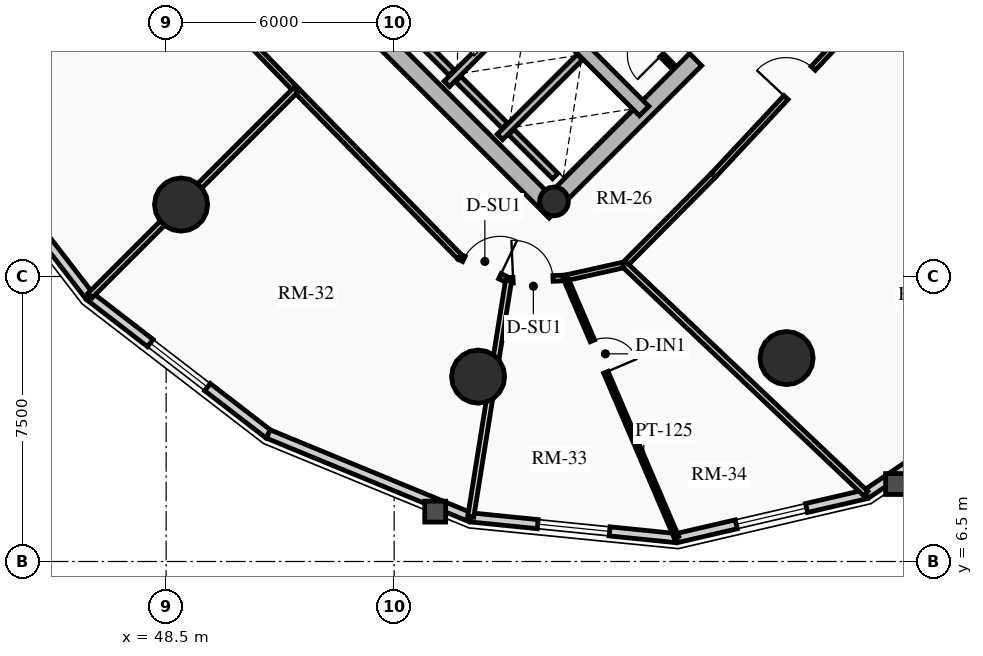
"""IFC4 building model, lengths in metres.
Left out: names, types, materials, properties, quantities, classifications, styles, units other than length and angle.
Written with IfcOpenShell. Run it as: python <this file> out.ifc"""

import sys

from ifc_helpers import new_model, si_unit, direction, frame, frame_2d, origin, origin_2d, place, context, subcontext, project, spatial, rectangle, circle, hollow_circle, extrude, source, transform, mapped, element, fill, save


model = new_model("IFC4")
c1 = context("Model", 3, precision=1e-05, world=origin(), true_north=direction((0.0, 1.0)))
c2 = subcontext(c1, "Body", "Model", "MODEL_VIEW")
j1 = project(units=[si_unit("LENGTHUNIT", "METRE"), si_unit("PLANEANGLEUNIT", "RADIAN")], contexts=[c1])
p1 = place(None, origin())
s1 = spatial("IfcSite", under=j1, at=p1, CompositionType="ELEMENT")
p2 = place(p1, origin())
s2 = spatial("IfcBuilding", under=s1, at=p2, CompositionType="ELEMENT")
p3 = place(p2, frame((0.0, 0.0, 81.79)))
s3 = spatial("IfcBuildingStorey", under=s2, at=p3, CompositionType="ELEMENT", Elevation=81.79)
p4 = place(p3, frame((58.737, 15.697, 0.0), z_axis=(0.0, 0.0, 1.0), x_axis=(-0.707106781187, 0.707106781187, 0.0)))
e1 = element("IfcWall", 1, at=p4, inside=s3, PredefinedType="SHEAR", context=c2, shape_type="SweptSolid", body=[
    extrude(rectangle(XDim=14.2, YDim=0.45, at=frame_2d((7.1, 0.0))), origin(), (0.0, 0.0, 1.0), 2.91),
])
p5 = place(p3, frame((58.578, 15.856, 0.0), z_axis=(0.0, 0.0, 1.0), x_axis=(0.707106781187, 0.707106781187, 0.0)))
e2 = element("IfcWall", 2, at=p5, inside=s3, PredefinedType="SHEAR", context=c2, shape_type="SweptSolid", body=[
    extrude(rectangle(XDim=10.7, YDim=0.45, at=frame_2d((5.35, 0.0))), origin(), (0.0, 0.0, 1.0), 2.91),
])
m1 = source(origin(), c2, "Body", "SweptSolid", [
    extrude(rectangle(XDim=1.5, YDim=2.02, at=frame_2d((0.75, 1.01))), frame((0.0, 0.235, 0.0), z_axis=(0.0, -1.0, 0.0), x_axis=(1.0, 0.0, 0.0)), (0.0, 0.0, 1.0), 0.47),
])
p6 = place(p5, frame((5.45, 0.0, 0.0)))
e3 = element("IfcOpeningElement", 3, at=p6, cuts=e2, PredefinedType="OPENING", context=c2, shape_type="MappedRepresentation", body=[
    mapped(m1, transform((0.0, 0.0, 0.0), x_axis=(1.0, 0.0, 0.0), y_axis=(0.0, 1.0, 0.0), z_axis=(0.0, 0.0, 1.0), scale=1.0)),
])
p7 = place(p3, frame((61.078, 18.355, 0.0), z_axis=(0.0, 0.0, 1.0), x_axis=(-0.707106781187, 0.707106781187, 0.0)))
e4 = element("IfcWall", 4, at=p7, inside=s3, PredefinedType="SHEAR", context=c2, shape_type="SweptSolid", body=[
    extrude(rectangle(XDim=13.75, YDim=0.35, at=frame_2d((6.875, 0.0))), origin(), (0.0, 0.0, 1.0), 2.91),
])
m2 = source(origin(), c2, "Body", "SweptSolid", [
    extrude(rectangle(XDim=1.1, YDim=2.015, at=frame_2d((0.55, 1.007))), frame((0.0, 0.185, 0.0), z_axis=(0.0, -1.0, 0.0), x_axis=(1.0, 0.0, 0.0)), (0.0, 0.0, 1.0), 0.37),
])
p8 = place(p7, frame((4.875, 0.0, 0.0)))
e5 = element("IfcOpeningElement", 5, at=p8, cuts=e4, PredefinedType="OPENING", context=c2, shape_type="MappedRepresentation", body=[
    mapped(m2, transform((0.0, 0.0, 0.0), x_axis=(1.0, 0.0, 0.0), y_axis=(0.0, 1.0, 0.0), z_axis=(0.0, 0.0, 1.0), scale=1.0)),
])
m3 = source(origin(), c2, "Body", "SweptSolid", [
    extrude(rectangle(XDim=1.15, YDim=2.02, at=frame_2d((0.575, 1.01))), frame((0.0, 0.185, 0.0), z_axis=(0.0, -1.0, 0.0), x_axis=(1.0, 0.0, 0.0)), (0.0, 0.0, 1.0), 0.37),
])
p9 = place(p7, frame((7.295, 0.0, 0.0)))
e6 = element("IfcOpeningElement", 6, at=p9, cuts=e4, PredefinedType="OPENING", context=c2, shape_type="MappedRepresentation", body=[
    mapped(m3, transform((0.0, 0.0, 0.0), x_axis=(1.0, 0.0, 0.0), y_axis=(0.0, 1.0, 0.0), z_axis=(0.0, 0.0, 1.0), scale=1.0)),
])
p10 = place(p3, frame((58.706, 15.976, 0.0), z_axis=(0.0, 0.0, 1.0), x_axis=(0.707106781187, 0.707106781187, 0.0)))
e7 = element("IfcColumn", 7, at=p10, inside=s3, PredefinedType="COLUMN", context=c2, shape_type="SweptSolid", body=[
    extrude(hollow_circle(Radius=0.38, WallThickness=0.032, at=origin_2d()), origin(), (0.0, 0.0, 1.0), 2.91),
])
for number, where, z_axis, x_axis in (
    (8, (48.893, 15.893, 0.0), (0.0, 0.0, 1.0), (1.0, 0.0, 0.0)),
    (9, (56.709, 11.365, 0.0), (0.0, 0.0, 1.0), (1.0, 0.0, 0.0)),
    (10, (64.827, 11.854, 0.0), (0.0, 0.0, 1.0), (1.0, 0.0, 0.0)),
):
    element("IfcColumn", number, at=place(p3, frame(where, z_axis=z_axis, x_axis=x_axis)), inside=s3, PredefinedType="USERDEFINED", context=c2, shape_type="SweptSolid", body=[
        extrude(circle(Radius=0.7, at=origin_2d()), origin(), (0.0, 0.0, 1.0), 2.91),
    ])
p11 = place(p3, frame((46.483, 13.483, 0.0), z_axis=(0.0, 0.0, 1.0), x_axis=(-0.61054437102, 0.791982052206, 0.0)))
e11 = element("IfcWall", 11, at=p11, inside=s3, PredefinedType="SOLIDWALL", context=c2, shape_type="SweptSolid", body=[
    extrude(rectangle(XDim=5.942, YDim=0.24, at=frame_2d((2.971, 0.0))), origin(), (0.0, 0.0, 1.0), 2.179),
])
p12 = place(p3, frame((51.189, 9.855, 0.0), z_axis=(0.0, 0.0, 1.0), x_axis=(-0.791982052206, 0.61054437102, 0.0)))
e12 = element("IfcWall", 12, at=p12, inside=s3, PredefinedType="SOLIDWALL", context=c2, shape_type="SweptSolid", body=[
    extrude(rectangle(XDim=5.942, YDim=0.24, at=frame_2d((2.971, 0.0))), origin(), (0.0, 0.0, 1.0), 2.179),
])
m4 = source(origin(), c2, "Body", "SweptSolid", [
    extrude(rectangle(XDim=1.9, YDim=1.35, at=frame_2d((0.95, 0.675))), frame((0.0, 0.13, 0.0), z_axis=(0.0, -1.0, 0.0), x_axis=(1.0, 0.0, 0.0)), (0.0, 0.0, 1.0), 0.26),
])
p13 = place(p12, frame((2.021, 0.0, 0.65)))
e13 = element("IfcOpeningElement", 13, at=p13, cuts=e12, PredefinedType="OPENING", context=c2, shape_type="MappedRepresentation", body=[
    mapped(m4, transform((0.0, 0.0, 0.0), x_axis=(1.0, 0.0, 0.0), y_axis=(0.0, 1.0, 0.0), z_axis=(0.0, 0.0, 1.0), scale=1.0)),
])
p14 = place(p3, frame((56.513, 7.661, 0.0), z_axis=(0.0, 0.0, 1.0), x_axis=(-0.924563909604, 0.381027003055, 0.0)))
e14 = element("IfcWall", 14, at=p14, inside=s3, PredefinedType="SOLIDWALL", context=c2, shape_type="SweptSolid", body=[
    extrude(rectangle(XDim=5.758, YDim=0.24, at=frame_2d((2.879, 0.0))), origin(), (0.0, 0.0, 1.0), 2.179),
])
p15 = place(p3, frame((61.933, 7.115, 0.0), z_axis=(0.0, 0.0, 1.0), x_axis=(-0.994971754311, 0.10015591906, 0.0)))
e15 = element("IfcWall", 15, at=p15, inside=s3, PredefinedType="SOLIDWALL", context=c2, shape_type="SweptSolid", body=[
    extrude(rectangle(XDim=5.448, YDim=0.24, at=frame_2d((2.724, 0.0))), origin(), (0.0, 0.0, 1.0), 2.179),
])
p16 = place(p15, frame((1.774, 0.0, 0.65)))
e16 = element("IfcOpeningElement", 16, at=p16, cuts=e15, PredefinedType="OPENING", context=c2, shape_type="MappedRepresentation", body=[
    mapped(m4, transform((0.0, 0.0, 0.0), x_axis=(1.0, 0.0, 0.0), y_axis=(0.0, 1.0, 0.0), z_axis=(0.0, 0.0, 1.0), scale=1.0)),
])
p17 = place(p3, frame((66.92, 8.271, 0.0), z_axis=(0.0, 0.0, 1.0), x_axis=(-0.974165631126, -0.225834725257, 0.0)))
e17 = element("IfcWall", 17, at=p17, inside=s3, PredefinedType="SOLIDWALL", context=c2, shape_type="SweptSolid", body=[
    extrude(rectangle(XDim=5.119, YDim=0.24, at=frame_2d((2.56, 0.0))), origin(), (0.0, 0.0, 1.0), 2.179),
])
p18 = place(p17, frame((1.609, 0.0, 0.65)))
e18 = element("IfcOpeningElement", 18, at=p18, cuts=e17, PredefinedType="OPENING", context=c2, shape_type="MappedRepresentation", body=[
    mapped(m4, transform((0.0, 0.0, 0.0), x_axis=(1.0, 0.0, 0.0), y_axis=(0.0, 1.0, 0.0), z_axis=(0.0, 0.0, 1.0), scale=1.0)),
])
p19 = place(p3, frame((70.985, 11.015, 0.0), z_axis=(0.0, 0.0, 1.0), x_axis=(-0.828781148131, -0.559572880421, 0.0)))
e19 = element("IfcWall", 19, at=p19, inside=s3, PredefinedType="SOLIDWALL", context=c2, shape_type="SweptSolid", body=[
    extrude(rectangle(XDim=4.905, YDim=0.24, at=frame_2d((2.452, 0.0))), origin(), (0.0, 0.0, 1.0), 2.179),
])
p20 = place(p3, frame((55.888, 19.069, 0.0), z_axis=(0.0, 0.0, 1.0), x_axis=(0.707106781187, 0.707106781187, 0.0)))
e20 = element("IfcWall", 20, at=p20, inside=s3, PredefinedType="SHEAR", context=c2, shape_type="SweptSolid", body=[
    extrude(rectangle(XDim=2.97, YDim=0.2, at=frame_2d((1.485, 0.0))), origin(), (0.0, 0.0, 1.0), 2.91),
])
p21 = place(p3, frame((56.015, 19.366, 0.0), z_axis=(0.0, 0.0, 1.0), x_axis=(-0.707106781187, 0.707106781187, 0.0)))
e21 = element("IfcWall", 21, at=p21, inside=s3, PredefinedType="SHEAR", context=c2, shape_type="SweptSolid", body=[
    extrude(rectangle(XDim=2.44, YDim=0.2, at=frame_2d((1.22, 0.0))), origin(), (0.0, 0.0, 1.0), 2.91),
])
p22 = place(p3, frame((57.284, 17.673, 0.0), z_axis=(0.0, 0.0, 1.0), x_axis=(0.707147878904, 0.70706568108, 0.0)))
e22 = element("IfcWall", 22, at=p22, inside=s3, PredefinedType="SHEAR", context=c2, shape_type="SweptSolid", body=[
    extrude(rectangle(XDim=2.97, YDim=0.2, at=frame_2d((1.485, 0.0))), origin(), (0.0, 0.0, 1.0), 2.91),
])
p23 = place(p3, frame((57.412, 17.97, 0.0), z_axis=(0.0, 0.0, 1.0), x_axis=(-0.707106781187, 0.707106781187, 0.0)))
e23 = element("IfcWall", 23, at=p23, inside=s3, PredefinedType="SHEAR", context=c2, shape_type="SweptSolid", body=[
    extrude(rectangle(XDim=1.735, YDim=0.2, at=frame_2d((0.867, 0.0))), origin(), (0.0, 0.0, 1.0), 2.91),
])
p24 = place(p3, frame((58.737, 16.644, 0.0), z_axis=(0.0, 0.0, 1.0), x_axis=(-0.707032117043, 0.707181437447, 0.0)))
e24 = element("IfcWall", 24, at=p24, inside=s3, PredefinedType="SHEAR", context=c2, shape_type="SweptSolid", body=[
    extrude(rectangle(XDim=1.635, YDim=0.2, at=frame_2d((0.817, 0.0))), origin(), (0.0, 0.0, 1.0), 2.91),
])
p25 = place(p3, frame((61.835, 19.529, 0.0), z_axis=(0.0, 0.0, 1.0), x_axis=(-0.707174592913, 0.707038962956, 0.0)))
e25 = element("IfcWall", 25, at=p25, inside=s3, PredefinedType="PARTITIONING", context=c2, shape_type="SweptSolid", body=[
    extrude(rectangle(XDim=1.8, YDim=0.125, at=frame_2d((0.9, 0.0))), origin(), (0.0, 0.0, 1.0), 2.655),
])
m5 = source(origin(), c2, "Body", "SweptSolid", [
    extrude(rectangle(XDim=0.9, YDim=2.005, at=frame_2d((0.45, 1.002))), frame((0.0, 0.073, 0.0), z_axis=(0.0, -1.0, 0.0), x_axis=(1.0, 0.0, 0.0)), (0.0, 0.0, 1.0), 0.145),
])
p26 = place(p25, frame((0.42, 0.0, 0.0)))
e26 = element("IfcOpeningElement", 26, at=p26, cuts=e25, PredefinedType="OPENING", context=c2, shape_type="MappedRepresentation", body=[
    mapped(m5, transform((0.0, 0.0, 0.0), x_axis=(1.0, 0.0, 0.0), y_axis=(0.0, 1.0, 0.0), z_axis=(0.0, 0.0, 1.0), scale=1.0)),
])
p27 = place(p3, frame((47.706, 23.253, 0.0), z_axis=(0.0, 0.0, 1.0), x_axis=(0.696179266346, -0.717867974707, 0.0)))
e27 = element("IfcWall", 27, at=p27, inside=s3, PredefinedType="PARTITIONING", context=c2, shape_type="SweptSolid", body=[
    extrude(rectangle(XDim=6.045, YDim=0.15, at=frame_2d((3.022, 0.0))), origin(), (0.0, 0.0, 1.0), 2.655),
])
m6 = source(origin(), c2, "Body", "SweptSolid", [
    extrude(rectangle(XDim=1.05, YDim=2.015, at=frame_2d((0.525, 1.007))), frame((0.0, 0.085, 0.0), z_axis=(0.0, -1.0, 0.0), x_axis=(1.0, 0.0, 0.0)), (0.0, 0.0, 1.0), 0.17),
])
p28 = place(p27, frame((2.497, 0.0, 0.0)))
e28 = element("IfcOpeningElement", 28, at=p28, cuts=e27, PredefinedType="OPENING", context=c2, shape_type="MappedRepresentation", body=[
    mapped(m6, transform((0.0, 0.0, 0.0), x_axis=(1.0, 0.0, 0.0), y_axis=(0.0, 1.0, 0.0), z_axis=(0.0, 0.0, 1.0), scale=1.0)),
])
p29 = place(p3, frame((51.914, 18.914, 0.0), z_axis=(0.0, 0.0, 1.0), x_axis=(0.699999313799, -0.714143515465, 0.0)))
e29 = element("IfcWall", 29, at=p29, inside=s3, PredefinedType="PARTITIONING", context=c2, shape_type="SweptSolid", body=[
    extrude(rectangle(XDim=6.162, YDim=0.15, at=frame_2d((3.081, 0.0))), origin(), (0.0, 0.0, 1.0), 2.225),
])
p30 = place(p3, frame((56.227, 14.513, 0.0), z_axis=(0.0, 0.0, 1.0), x_axis=(0.901477579283, -0.432825801044, 0.0)))
e30 = element("IfcWall", 30, at=p30, inside=s3, PredefinedType="PARTITIONING", context=c2, shape_type="SweptSolid", body=[
    extrude(rectangle(XDim=1.424, YDim=0.15, at=frame_2d((0.712, 0.0))), origin(), (0.0, 0.0, 1.0), 2.225),
])
p31 = place(p30, frame((0.12, 0.0, 0.0)))
e31 = element("IfcOpeningElement", 31, at=p31, cuts=e30, PredefinedType="OPENING", context=c2, shape_type="MappedRepresentation", body=[
    mapped(m6, transform((0.0, 0.0, 0.0), x_axis=(1.0, 0.0, 0.0), y_axis=(0.0, 1.0, 0.0), z_axis=(0.0, 0.0, 1.0), scale=1.0)),
])
p32 = place(p3, frame((57.511, 13.897, 0.0), z_axis=(0.0, 0.0, 1.0), x_axis=(0.999024538494, 0.044158481476, 0.0)))
e32 = element("IfcWall", 32, at=p32, inside=s3, PredefinedType="PARTITIONING", context=c2, shape_type="SweptSolid", body=[
    extrude(rectangle(XDim=1.498, YDim=0.15, at=frame_2d((0.749, 0.0))), origin(), (0.0, 0.0, 1.0), 2.225),
])
p33 = place(p32, frame((0.12, 0.0, 0.0)))
e33 = element("IfcOpeningElement", 33, at=p33, cuts=e32, PredefinedType="OPENING", context=c2, shape_type="MappedRepresentation", body=[
    mapped(m6, transform((0.0, 0.0, 0.0), x_axis=(1.0, 0.0, 0.0), y_axis=(0.0, 1.0, 0.0), z_axis=(0.0, 0.0, 1.0), scale=1.0)),
])
p34 = place(p3, frame((59.008, 13.963, 0.0), z_axis=(0.0, 0.0, 1.0), x_axis=(0.976020856791, 0.21767702476, 0.0)))
e34 = element("IfcWall", 34, at=p34, inside=s3, PredefinedType="PARTITIONING", context=c2, shape_type="SweptSolid", body=[
    extrude(rectangle(XDim=1.593, YDim=0.15, at=frame_2d((0.796, 0.0))), origin(), (0.0, 0.0, 1.0), 2.225),
])
p35 = place(p3, frame((60.562, 14.31, 0.0), z_axis=(0.0, 0.0, 1.0), x_axis=(0.704566236161, 0.709638230975, 0.0)))
e35 = element("IfcWall", 35, at=p35, inside=s3, PredefinedType="PARTITIONING", context=c2, shape_type="SweptSolid", body=[
    extrude(rectangle(XDim=3.321, YDim=0.15, at=frame_2d((1.661, 0.0))), origin(), (0.0, 0.0, 1.0), 2.225),
])
p36 = place(p3, frame((62.903, 16.667, 0.0), z_axis=(0.0, 0.0, 1.0), x_axis=(0.682371947497, 0.731005147225, 0.0)))
e36 = element("IfcWall", 36, at=p36, inside=s3, PredefinedType="PARTITIONING", context=c2, shape_type="SweptSolid", body=[
    extrude(rectangle(XDim=6.642, YDim=0.15, at=frame_2d((3.321, 0.0))), origin(), (0.0, 0.0, 1.0), 2.225),
])
p37 = place(p36, frame((2.796, 0.0, 0.0)))
e37 = element("IfcOpeningElement", 37, at=p37, cuts=e36, PredefinedType="OPENING", context=c2, shape_type="MappedRepresentation", body=[
    mapped(m6, transform((0.0, 0.0, 0.0), x_axis=(1.0, 0.0, 0.0), y_axis=(0.0, 1.0, 0.0), z_axis=(0.0, 0.0, 1.0), scale=1.0)),
])
p38 = place(p3, frame((51.914, 18.914, 0.0), z_axis=(0.0, 0.0, 1.0), x_axis=(-0.707106781187, -0.707106781187, 0.0)))
e38 = element("IfcWall", 38, at=p38, inside=s3, PredefinedType="PARTITIONING", context=c2, shape_type="SweptSolid", body=[
    extrude(rectangle(XDim=7.661, YDim=0.16, at=frame_2d((3.831, 0.0))), origin(), (0.0, 0.0, 1.0), 2.179),
])
p39 = place(p3, frame((57.511, 13.897, 0.0), z_axis=(0.0, 0.0, 1.0), x_axis=(-0.15810696167, -0.987421991183, 0.0)))
e39 = element("IfcWall", 39, at=p39, inside=s3, PredefinedType="PARTITIONING", context=c2, shape_type="SweptSolid", body=[
    extrude(rectangle(XDim=6.295, YDim=0.16, at=frame_2d((3.148, 0.0))), origin(), (0.0, 0.0, 1.0), 2.179),
])
p40 = place(p3, frame((60.562, 14.31, 0.0), z_axis=(0.0, 0.0, 1.0), x_axis=(0.725582293335, -0.688135404989, 0.0)))
e40 = element("IfcWall", 40, at=p40, inside=s3, PredefinedType="PARTITIONING", context=c2, shape_type="SweptSolid", body=[
    extrude(rectangle(XDim=8.749, YDim=0.16, at=frame_2d((4.375, 0.0))), origin(), (0.0, 0.0, 1.0), 2.179),
])
p41 = place(p3, frame((67.435, 21.521, 0.0), z_axis=(0.0, 0.0, 1.0), x_axis=(0.6983880073, -0.715719352302, 0.0)))
e41 = element("IfcWall", 41, at=p41, inside=s3, PredefinedType="PARTITIONING", context=c2, shape_type="SweptSolid", body=[
    extrude(rectangle(XDim=8.987, YDim=0.16, at=frame_2d((4.494, 0.0))), origin(), (0.0, 0.0, 1.0), 2.179),
])
p42 = place(p3, frame((59.008, 13.963, 0.0), z_axis=(0.0, 0.0, 1.0), x_axis=(0.393439207333, -0.919350635032, 0.0)))
e42 = element("IfcWall", 42, at=p42, inside=s3, PredefinedType="PARTITIONING", context=c2, shape_type="SweptSolid", body=[
    extrude(rectangle(XDim=7.427, YDim=0.125, at=frame_2d((3.713, 0.0))), origin(), (0.0, 0.0, 1.0), 2.179),
])
p43 = place(p42, frame((1.8, 0.0, 0.0)))
e43 = element("IfcOpeningElement", 43, at=p43, cuts=e42, PredefinedType="OPENING", context=c2, shape_type="MappedRepresentation", body=[
    mapped(m5, transform((0.0, 0.0, 0.0), x_axis=(1.0, 0.0, 0.0), y_axis=(0.0, 1.0, 0.0), z_axis=(0.0, 0.0, 1.0), scale=1.0)),
])
m7 = source(origin(), c2, "Body", "SweptSolid", [
    extrude(rectangle(XDim=1.9, YDim=1.35, at=frame_2d((0.95, 0.675))), frame((0.0, 0.03, 0.0), z_axis=(0.0, -1.0, 0.0), x_axis=(1.0, 0.0, 0.0)), (0.0, 0.0, 1.0), 0.06),
])
p44 = place(p13, origin())
e44 = element("IfcWindow", 44, at=p44, inside=s3, PartitioningType="DOUBLE_PANEL_VERTICAL", PredefinedType="WINDOW", context=c2, shape_type="MappedRepresentation", body=[
    mapped(m7, transform((0.0, 0.0, 0.0), x_axis=(1.0, 0.0, 0.0), y_axis=(0.0, 1.0, 0.0), z_axis=(0.0, 0.0, 1.0), scale=1.0)),
])
fill(e13, e44)
p45 = place(p16, origin())
e45 = element("IfcWindow", 45, at=p45, inside=s3, PartitioningType="DOUBLE_PANEL_VERTICAL", PredefinedType="WINDOW", context=c2, shape_type="MappedRepresentation", body=[
    mapped(m7, transform((0.0, 0.0, 0.0), x_axis=(1.0, 0.0, 0.0), y_axis=(0.0, 1.0, 0.0), z_axis=(0.0, 0.0, 1.0), scale=1.0)),
])
fill(e16, e45)
p46 = place(p18, origin())
e46 = element("IfcWindow", 46, at=p46, inside=s3, PartitioningType="DOUBLE_PANEL_VERTICAL", PredefinedType="WINDOW", context=c2, shape_type="MappedRepresentation", body=[
    mapped(m7, transform((0.0, 0.0, 0.0), x_axis=(1.0, 0.0, 0.0), y_axis=(0.0, 1.0, 0.0), z_axis=(0.0, 0.0, 1.0), scale=1.0)),
])
fill(e18, e46)
m8 = source(origin(), c2, "Body", "SweptSolid", [
    extrude(rectangle(XDim=1.5, YDim=2.02, at=frame_2d((0.75, 1.01))), frame((0.0, 0.025, 0.0), z_axis=(0.0, -1.0, 0.0), x_axis=(1.0, 0.0, 0.0)), (0.0, 0.0, 1.0), 0.05),
])
p47 = place(p6, origin())
e47 = element("IfcDoor", 47, at=p47, inside=s3, OperationType="DOUBLE_DOOR_SINGLE_SWING", PredefinedType="DOOR", context=c2, shape_type="MappedRepresentation", body=[
    mapped(m8, transform((0.0, 0.0, 0.0), x_axis=(1.0, 0.0, 0.0), y_axis=(0.0, 1.0, 0.0), z_axis=(0.0, 0.0, 1.0), scale=1.0)),
])
fill(e3, e47)
m9 = source(origin(), c2, "Body", "SweptSolid", [
    extrude(rectangle(XDim=0.9, YDim=2.005, at=frame_2d((0.45, 1.002))), frame((0.0, 0.025, 0.0), z_axis=(0.0, -1.0, 0.0), x_axis=(1.0, 0.0, 0.0)), (0.0, 0.0, 1.0), 0.05),
])
p48 = place(p26, origin())
e48 = element("IfcDoor", 48, at=p48, inside=s3, OperationType="SINGLE_SWING_LEFT", PredefinedType="DOOR", context=c2, shape_type="MappedRepresentation", body=[
    mapped(m9, transform((0.0, 0.0, 0.0), x_axis=(1.0, 0.0, 0.0), y_axis=(0.0, 1.0, 0.0), z_axis=(0.0, 0.0, 1.0), scale=1.0)),
])
fill(e26, e48)
m10 = source(origin(), c2, "Body", "SweptSolid", [
    extrude(rectangle(XDim=1.05, YDim=2.015, at=frame_2d((0.525, 1.007))), frame((0.0, 0.025, 0.0), z_axis=(0.0, -1.0, 0.0), x_axis=(1.0, 0.0, 0.0)), (0.0, 0.0, 1.0), 0.05),
])
p49 = place(p31, origin())
e49 = element("IfcDoor", 49, at=p49, inside=s3, OperationType="SINGLE_SWING_RIGHT", PredefinedType="DOOR", context=c2, shape_type="MappedRepresentation", body=[
    mapped(m10, transform((0.0, 0.0, 0.0), x_axis=(1.0, 0.0, 0.0), y_axis=(0.0, 1.0, 0.0), z_axis=(0.0, 0.0, 1.0), scale=1.0)),
])
fill(e31, e49)
p50 = place(p33, origin())
e50 = element("IfcDoor", 50, at=p50, inside=s3, OperationType="SINGLE_SWING_LEFT", PredefinedType="DOOR", context=c2, shape_type="MappedRepresentation", body=[
    mapped(m10, transform((0.0, 0.0, 0.0), x_axis=(1.0, 0.0, 0.0), y_axis=(0.0, 1.0, 0.0), z_axis=(0.0, 0.0, 1.0), scale=1.0)),
])
fill(e33, e50)
p51 = place(p43, origin())
e51 = element("IfcDoor", 51, at=p51, inside=s3, OperationType="SINGLE_SWING_RIGHT", PredefinedType="DOOR", context=c2, shape_type="MappedRepresentation", body=[
    mapped(m9, transform((0.0, 0.0, 0.0), x_axis=(1.0, 0.0, 0.0), y_axis=(0.0, 1.0, 0.0), z_axis=(0.0, 0.0, 1.0), scale=1.0)),
])
fill(e43, e51)
p52 = place(p37, origin())
e52 = element("IfcDoor", 52, at=p52, inside=s3, OperationType="SINGLE_SWING_LEFT", PredefinedType="DOOR", context=c2, shape_type="MappedRepresentation", body=[
    mapped(m10, transform((0.0, 0.0, 0.0), x_axis=(1.0, 0.0, 0.0), y_axis=(0.0, 1.0, 0.0), z_axis=(0.0, 0.0, 1.0), scale=1.0)),
])
fill(e37, e52)
save(model, sys.argv[1])
